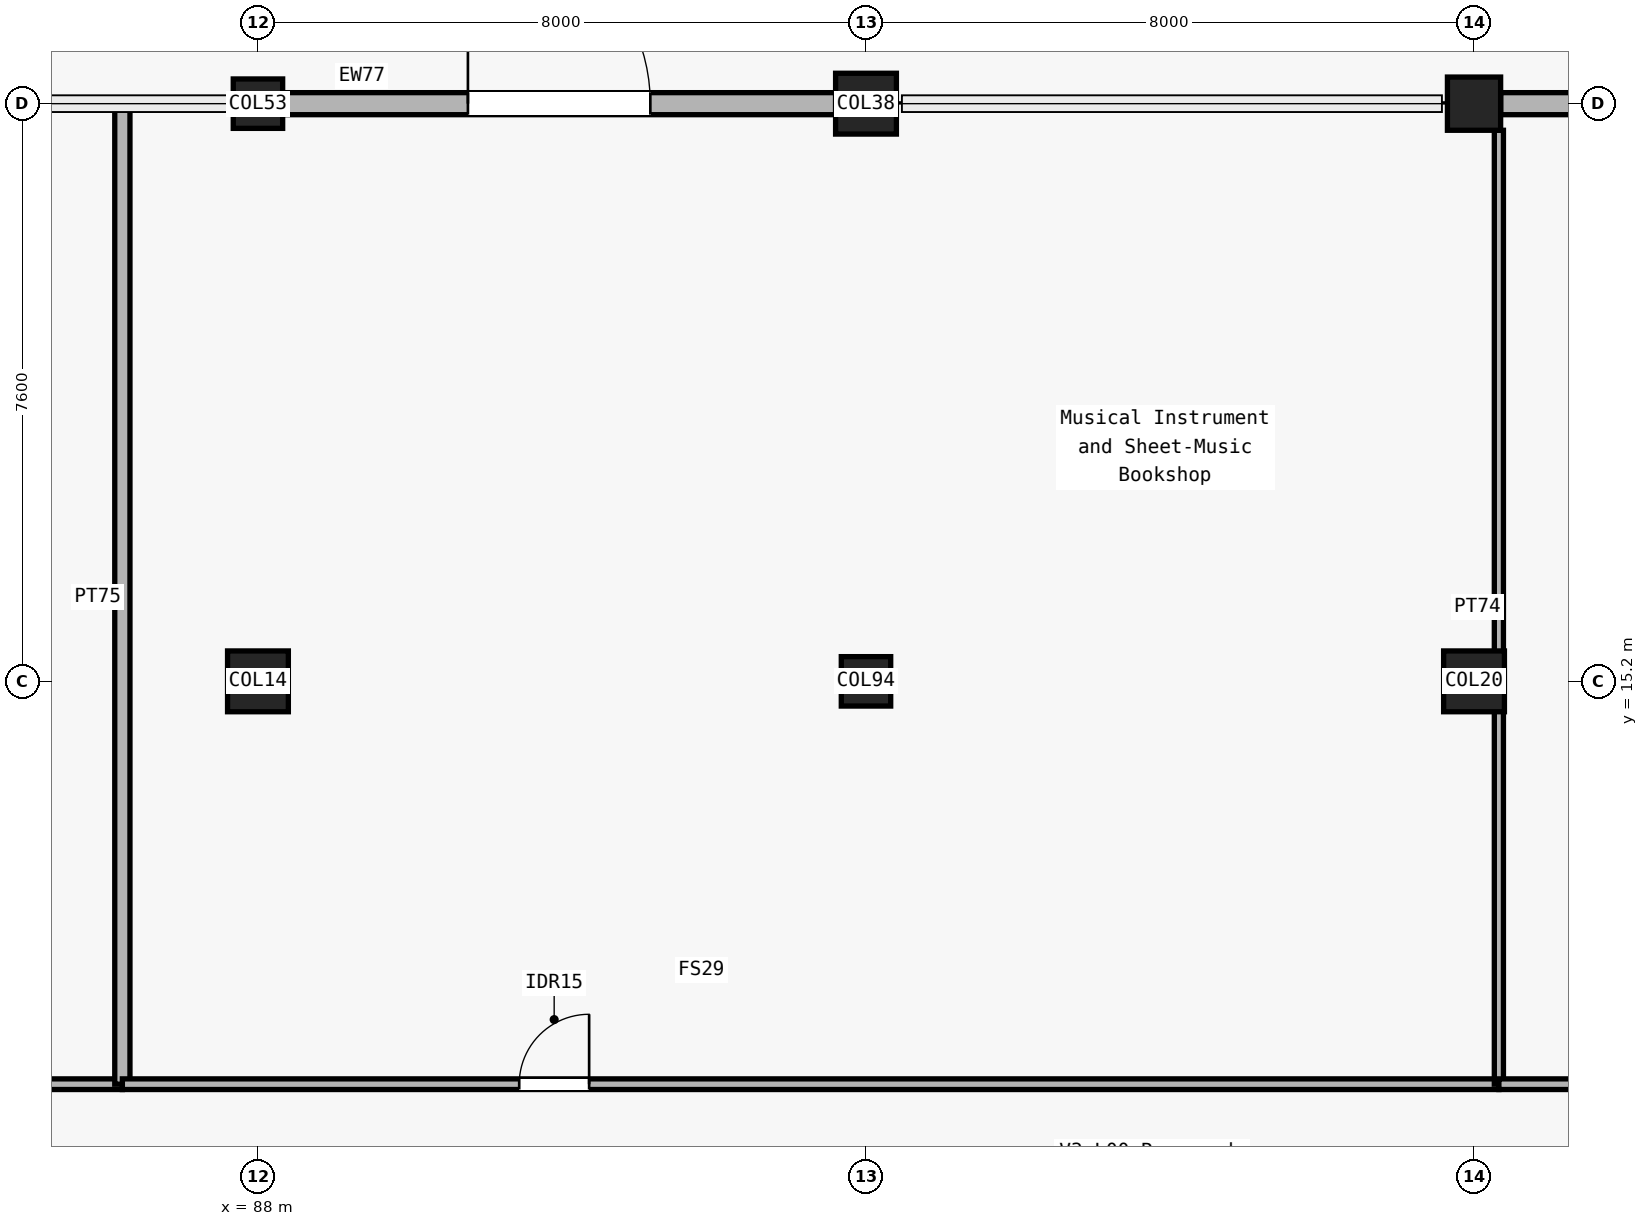
"""IFC4 building model, lengths in metres.
Left out: names, types, materials, properties, quantities, classifications, styles, units other than length and angle.
Written with IfcOpenShell. Run it as: python <this file> out.ifc"""

import sys

from ifc_helpers import new_model, si_unit, direction, frame, frame_2d, origin, origin_2d, place, context, subcontext, project, spatial, rectangle, circle, extrude, element, fill, save


model = new_model("IFC4")
c1 = context("Model", 3, precision=1e-05, world=origin(), true_north=direction((0.0, 1.0)))
c2 = subcontext(c1, "Body", "Model", "MODEL_VIEW")
j1 = project(units=[si_unit("LENGTHUNIT", "METRE"), si_unit("PLANEANGLEUNIT", "RADIAN")], contexts=[c1])
p1 = place(None, origin())
s1 = spatial("IfcSite", under=j1, at=p1, CompositionType="ELEMENT")
p2 = place(p1, origin())
s2 = spatial("IfcBuilding", under=s1, at=p2, CompositionType="ELEMENT")
p3 = place(p2, origin())
s3 = spatial("IfcBuildingStorey", under=s2, at=p3, CompositionType="ELEMENT", Elevation=0.0)
p4 = place(p3, frame((88.0, 15.2, 0.0), z_axis=(0.0, 0.0, 1.0), x_axis=(1.0, 0.0, 0.0)))
e1 = element("IfcColumn", 1, at=p4, inside=s3, PredefinedType="COLUMN", context=c2, shape_type="SweptSolid", body=[
    extrude(circle(Radius=0.4, at=origin_2d()), origin(), (0.0, 0.0, 1.0), 5.4),
])
for number, where, z_axis, x_axis in (
    (2, (88.0, 22.8, 0.0), (0.0, 0.0, 1.0), (1.0, 0.0, 0.0)),
    (3, (96.0, 15.2, 0.0), (0.0, 0.0, 1.0), (1.0, 0.0, 0.0)),
):
    element("IfcColumn", number, at=place(p3, frame(where, z_axis=z_axis, x_axis=x_axis)), inside=s3, PredefinedType="COLUMN", context=c2, shape_type="SweptSolid", body=[
        extrude(circle(Radius=0.325, at=origin_2d()), origin(), (0.0, 0.0, 1.0), 5.4),
    ])
for number, where, z_axis, x_axis in (
    (4, (96.0, 22.8, 0.0), (0.0, 0.0, 1.0), (1.0, 0.0, 0.0)),
    (5, (104.0, 15.2, 0.0), (0.0, 0.0, 1.0), (1.0, 0.0, 0.0)),
):
    element("IfcColumn", number, at=place(p3, frame(where, z_axis=z_axis, x_axis=x_axis)), inside=s3, PredefinedType="COLUMN", context=c2, shape_type="SweptSolid", body=[
        extrude(rectangle(XDim=0.8, YDim=0.8, at=origin_2d()), origin(), (0.0, 0.0, 1.0), 5.4),
    ])
p5 = place(p3, frame((104.0, 22.8, 0.0), z_axis=(0.0, 0.0, 1.0), x_axis=(1.0, 0.0, 0.0)))
e6 = element("IfcColumn", 6, at=p5, inside=s3, PredefinedType="COLUMN", context=c2, shape_type="SweptSolid", body=[
    extrude(rectangle(XDim=0.7, YDim=0.7, at=origin_2d()), origin(), (0.0, 0.0, 1.0), 5.4),
])
p6 = place(p3, frame((88.325, 22.8, 0.0), z_axis=(0.0, 0.0, 1.0), x_axis=(1.0, 0.0, 0.0)))
e7 = element("IfcWall", 7, at=p6, inside=s3, PredefinedType="SOLIDWALL", context=c2, shape_type="SweptSolid", body=[
    extrude(rectangle(XDim=7.275, YDim=0.29, at=frame_2d((3.638, 0.0))), origin(), (0.0, 0.0, 1.0), 4.8),
])
p7 = place(p6, frame((2.438, 0.0, 0.0)))
e8 = element("IfcOpeningElement", 8, at=p7, cuts=e7, PredefinedType="OPENING", context=c2, shape_type="SweptSolid", body=[
    extrude(rectangle(XDim=2.4, YDim=2.35, at=frame_2d((1.2, 1.175))), frame((0.0, 0.155, 0.0), z_axis=(0.0, -1.0, 0.0), x_axis=(1.0, 0.0, 0.0)), (0.0, 0.0, 1.0), 0.31),
])
p8 = place(p3, frame((104.35, 22.8, 0.0), z_axis=(0.0, 0.0, 1.0), x_axis=(1.0, 0.0, 0.0)))
e9 = element("IfcWall", 9, at=p8, inside=s3, PredefinedType="SOLIDWALL", context=c2, shape_type="SweptSolid", body=[
    extrude(rectangle(XDim=7.35, YDim=0.29, at=frame_2d((3.675, 0.0))), origin(), (0.0, 0.0, 1.0), 4.8),
])
p9 = place(p8, frame((2.675, 0.0, 0.0)))
e10 = element("IfcOpeningElement", 10, at=p9, cuts=e9, PredefinedType="OPENING", context=c2, shape_type="SweptSolid", body=[
    extrude(rectangle(XDim=2.0, YDim=2.25, at=frame_2d((1.0, 1.125))), frame((0.0, 0.155, 0.0), z_axis=(0.0, -1.0, 0.0), x_axis=(1.0, 0.0, 0.0)), (0.0, 0.0, 1.0), 0.31),
])
p10 = place(p3, frame((64.08, 9.9, 0.0), z_axis=(0.0, 0.0, 1.0), x_axis=(1.0, 0.0, 0.0)))
e11 = element("IfcWall", 11, at=p10, inside=s3, PredefinedType="PARTITIONING", context=c2, shape_type="SweptSolid", body=[
    extrude(rectangle(XDim=22.136, YDim=0.14, at=frame_2d((11.068, 0.0))), origin(), (0.0, 0.0, 1.0), 4.35),
])
p11 = place(p10, frame((18.846, 0.0, 0.0)))
e12 = element("IfcOpeningElement", 12, at=p11, cuts=e11, PredefinedType="OPENING", context=c2, shape_type="SweptSolid", body=[
    extrude(rectangle(XDim=1.08, YDim=2.1, at=frame_2d((0.54, 1.05))), frame((0.0, 0.08, 0.0), z_axis=(0.0, -1.0, 0.0), x_axis=(1.0, 0.0, 0.0)), (0.0, 0.0, 1.0), 0.16),
])
p12 = place(p3, frame((86.216, 9.9, 0.0), z_axis=(0.0, 0.0, 1.0), x_axis=(0.0, 1.0, 0.0)))
e13 = element("IfcWall", 13, at=p12, inside=s3, PredefinedType="PARTITIONING", context=c2, shape_type="SweptSolid", body=[
    extrude(rectangle(XDim=12.82, YDim=0.2, at=frame_2d((6.41, 0.0))), origin(), (0.0, 0.0, 1.0), 4.495),
])
p13 = place(p3, frame((86.216, 9.9, 0.0), z_axis=(0.0, 0.0, 1.0), x_axis=(1.0, 0.0, 0.0)))
e14 = element("IfcWall", 14, at=p13, inside=s3, PredefinedType="PARTITIONING", context=c2, shape_type="SweptSolid", body=[
    extrude(rectangle(XDim=18.111, YDim=0.14, at=frame_2d((9.055, 0.0))), origin(), (0.0, 0.0, 1.0), 4.275),
])
p14 = place(p13, frame((5.221, 0.0, 0.0)))
e15 = element("IfcOpeningElement", 15, at=p14, cuts=e14, PredefinedType="OPENING", context=c2, shape_type="SweptSolid", body=[
    extrude(rectangle(XDim=0.92, YDim=2.15, at=frame_2d((0.46, 1.075))), frame((0.0, 0.08, 0.0), z_axis=(0.0, -1.0, 0.0), x_axis=(1.0, 0.0, 0.0)), (0.0, 0.0, 1.0), 0.16),
])
p15 = place(p3, frame((104.327, 9.9, 0.0), z_axis=(0.0, 0.0, 1.0), x_axis=(0.0, 1.0, 0.0)))
e16 = element("IfcWall", 16, at=p15, inside=s3, PredefinedType="PARTITIONING", context=c2, shape_type="SweptSolid", body=[
    extrude(rectangle(XDim=12.55, YDim=0.12, at=frame_2d((6.275, 0.0))), origin(), (0.0, 0.0, 1.0), 4.325),
])
p16 = place(p3, frame((104.327, 9.9, 0.0), z_axis=(0.0, 0.0, 1.0), x_axis=(1.0, 0.0, 0.0)))
e17 = element("IfcWall", 17, at=p16, inside=s3, PredefinedType="PARTITIONING", context=c2, shape_type="SweptSolid", body=[
    extrude(rectangle(XDim=27.77, YDim=0.14, at=frame_2d((13.885, 0.0))), origin(), (0.0, 0.0, 1.0), 4.4),
])
p17 = place(p16, frame((2.853, 0.0, 0.0)))
e18 = element("IfcOpeningElement", 18, at=p17, cuts=e17, PredefinedType="OPENING", context=c2, shape_type="SweptSolid", body=[
    extrude(rectangle(XDim=0.98, YDim=2.15, at=frame_2d((0.49, 1.075))), frame((0.0, 0.08, 0.0), z_axis=(0.0, -1.0, 0.0), x_axis=(1.0, 0.0, 0.0)), (0.0, 0.0, 1.0), 0.16),
])
p18 = place(p7, origin())
e19 = element("IfcDoor", 19, at=p18, inside=s3, OperationType="SINGLE_SWING_LEFT", PredefinedType="DOOR", context=c2, shape_type="SweptSolid", body=[
    extrude(rectangle(XDim=2.4, YDim=2.35, at=frame_2d((1.2, 1.175))), frame((0.0, 0.025, 0.0), z_axis=(0.0, -1.0, 0.0), x_axis=(1.0, 0.0, 0.0)), (0.0, 0.0, 1.0), 0.05),
])
fill(e8, e19)
p19 = place(p14, origin())
e20 = element("IfcDoor", 20, at=p19, inside=s3, OperationType="SINGLE_SWING_RIGHT", PredefinedType="DOOR", context=c2, shape_type="SweptSolid", body=[
    extrude(rectangle(XDim=0.92, YDim=2.15, at=frame_2d((0.46, 1.075))), frame((0.0, 0.025, 0.0), z_axis=(0.0, -1.0, 0.0), x_axis=(1.0, 0.0, 0.0)), (0.0, 0.0, 1.0), 0.05),
])
fill(e15, e20)
save(model, sys.argv[1])
